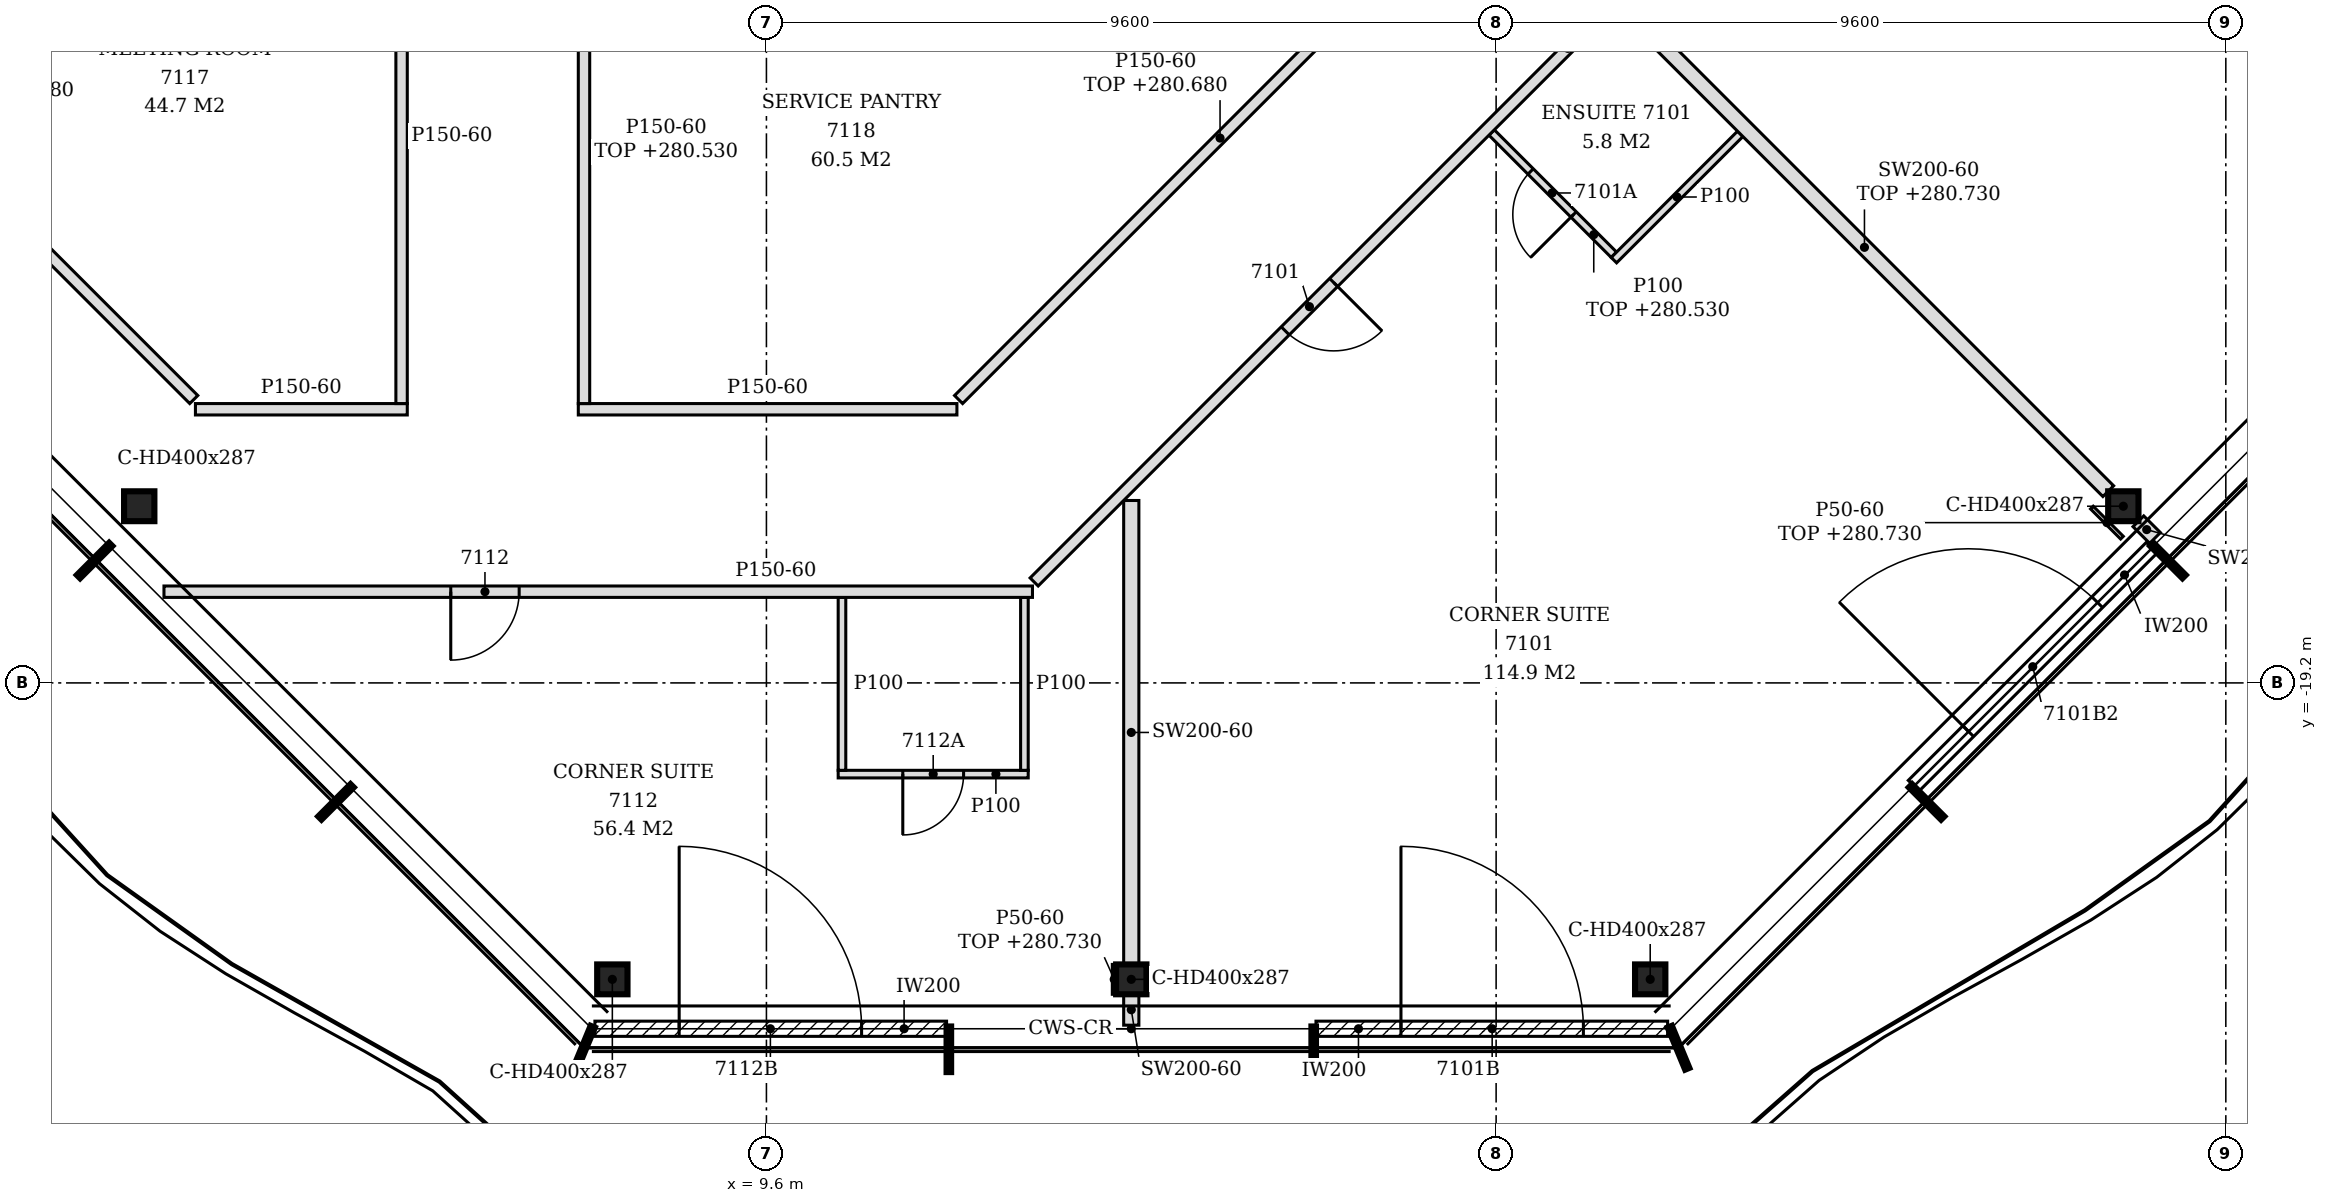
"""IFC4 building model, lengths in metres.
Left out: names, types, materials, properties, quantities, classifications, styles, units other than length and angle.
Written with IfcOpenShell. Run it as: python <this file> out.ifc"""

import sys

from ifc_helpers import new_model, si_unit, direction, frame, frame_2d, origin, origin_2d, place, context, subcontext, project, spatial, polyline, rectangle, i_section, outline, extrude, element, fill, save


model = new_model("IFC4")
c1 = context("Model", 3, precision=1e-05, world=origin(), true_north=direction((0.0, 1.0)))
c2 = subcontext(c1, "Body", "Model", "MODEL_VIEW")
j1 = project(units=[si_unit("LENGTHUNIT", "METRE"), si_unit("PLANEANGLEUNIT", "RADIAN")], contexts=[c1])
p1 = place(None, origin())
s1 = spatial("IfcSite", under=j1, at=p1, CompositionType="ELEMENT")
p2 = place(p1, origin())
s2 = spatial("IfcBuilding", under=s1, at=p2, CompositionType="ELEMENT")
p3 = place(p2, frame((0.0, 0.0, 277.8)))
s3 = spatial("IfcBuildingStorey", under=s2, at=p3, CompositionType="ELEMENT", Elevation=277.8)
for number, where, z_axis, x_axis in (
    (1, (7.573, -23.1, -0.15), (0.0, 0.0, 1.0), (1.0, 0.0, 0.0)),
    (2, (14.4, -23.1, -0.15), (0.0, 0.0, 1.0), (1.0, 0.0, 0.0)),
    (3, (21.227, -23.1, -0.15), (0.0, 0.0, 1.0), (1.0, 0.0, 0.0)),
    (4, (27.451, -16.876, -0.15), (0.0, 0.0, 1.0), (1.0, 0.0, 0.0)),
    (5, (1.348, -16.876, -0.15), (0.0, 0.0, 1.0), (1.0, 0.0, 0.0)),
):
    element("IfcColumn", number, at=place(p3, frame(where, z_axis=z_axis, x_axis=x_axis)), inside=s3, PredefinedType="COLUMN", context=c2, shape_type="SweptSolid", body=[
        extrude(i_section(OverallWidth=0.399, OverallDepth=0.393, WebThickness=0.023, FlangeThickness=0.037, FilletRadius=0.015, at=origin_2d()), origin(), (0.0, 0.0, 1.0), 3.6),
    ])
p4 = place(p3, frame((7.344, -23.75, 0.0), z_axis=(0.0, 0.0, 1.0), x_axis=(1.0, 0.0, 0.0)))
e6 = element("IfcWall", 6, at=p4, inside=s3, PredefinedType="NOTDEFINED", context=c2, shape_type="SweptSolid", body=[
    extrude(rectangle(XDim=4.626, YDim=0.2, at=frame_2d((2.313, 0.0))), origin(), (0.0, 0.0, 1.0), 3.45),
])
p5 = place(p4, frame((1.108, 0.0, 0.0)))
e7 = element("IfcOpeningElement", 7, at=p5, cuts=e6, PredefinedType="OPENING", context=c2, shape_type="SweptSolid", body=[
    extrude(rectangle(XDim=2.4, YDim=2.4, at=frame_2d((1.2, 1.2))), frame((0.0, 0.11, 0.0), z_axis=(0.0, -1.0, 0.0), x_axis=(1.0, 0.0, 0.0)), (0.0, 0.0, 1.0), 0.22),
])
p6 = place(p3, frame((16.83, -23.75, 0.0), z_axis=(0.0, 0.0, 1.0), x_axis=(1.0, 0.0, 0.0)))
e8 = element("IfcWall", 8, at=p6, inside=s3, PredefinedType="NOTDEFINED", context=c2, shape_type="SweptSolid", body=[
    extrude(rectangle(XDim=4.626, YDim=0.2, at=frame_2d((2.313, 0.0))), origin(), (0.0, 0.0, 1.0), 3.45),
])
p7 = place(p6, frame((1.118, 0.0, 0.0)))
e9 = element("IfcOpeningElement", 9, at=p7, cuts=e8, PredefinedType="OPENING", context=c2, shape_type="SweptSolid", body=[
    extrude(rectangle(XDim=2.4, YDim=2.4, at=frame_2d((1.2, 1.2))), frame((0.0, 0.11, 0.0), z_axis=(0.0, -1.0, 0.0), x_axis=(1.0, 0.0, 0.0)), (0.0, 0.0, 1.0), 0.22),
])
p8 = place(p3, frame((24.693, -20.553, 0.0), z_axis=(0.0, 0.0, 1.0), x_axis=(0.707079231393, 0.707134329907, 0.0)))
e10 = element("IfcWall", 10, at=p8, inside=s3, PredefinedType="NOTDEFINED", context=c2, shape_type="SweptSolid", body=[
    extrude(rectangle(XDim=4.431, YDim=0.2, at=frame_2d((2.215, 0.0))), origin(), (0.0, 0.0, 1.0), 3.45),
])
p9 = place(p8, frame((1.015, 0.0, 0.0)))
e11 = element("IfcOpeningElement", 11, at=p9, cuts=e10, PredefinedType="OPENING", context=c2, shape_type="SweptSolid", body=[
    extrude(rectangle(XDim=2.4, YDim=2.4, at=frame_2d((1.2, 1.2))), frame((0.0, 0.11, 0.0), z_axis=(0.0, -1.0, 0.0), x_axis=(1.0, 0.0, 0.0)), (0.0, 0.0, 1.0), 0.22),
])
p10 = place(p3, frame((14.4, -23.703, 0.0), z_axis=(0.0, 0.0, 1.0), x_axis=(0.0, 1.0, 0.0)))
e12 = element("IfcWall", 12, at=p10, inside=s3, PredefinedType="PARTITIONING", context=c2, shape_type="SweptSolid", body=[
    extrude(rectangle(XDim=0.406, YDim=0.2, at=frame_2d((0.203, 0.0))), origin(), (0.0, 0.0, 1.0), 3.45),
])
p11 = place(p3, frame((14.4, -22.904, 0.0), z_axis=(0.0, 0.0, 1.0), x_axis=(0.0, 1.0, 0.0)))
e13 = element("IfcWall", 13, at=p11, inside=s3, PredefinedType="PARTITIONING", context=c2, shape_type="SweptSolid", body=[
    extrude(outline(polyline([(0.0, 0.0), (6.104, 0.0), (6.104, 3.45), (3.809, 3.45), (3.806, 2.88), (3.598, 2.88), (3.596, 3.45), (0.0, 3.45), (0.0, 0.0)])), frame((0.0, 0.1, 0.0), z_axis=(0.0, -1.0, 0.0), x_axis=(1.0, 0.0, 0.0)), (0.0, 0.0, 1.0), 0.2),
])
p12 = place(p3, frame((10.544, -20.4, 0.0), z_axis=(0.0, 0.0, 1.0), x_axis=(1.0, 0.0, 0.0)))
e14 = element("IfcWall", 14, at=p12, inside=s3, PredefinedType="PARTITIONING", context=c2, shape_type="SweptSolid", body=[
    extrude(rectangle(XDim=2.5, YDim=0.1, at=frame_2d((1.25, 0.0))), origin(), (0.0, 0.0, 1.0), 3.45),
])
p13 = place(p12, frame((0.85, 0.0, 0.0)))
e15 = element("IfcOpeningElement", 15, at=p13, cuts=e14, PredefinedType="OPENING", context=c2, shape_type="SweptSolid", body=[
    extrude(rectangle(XDim=0.8, YDim=2.1, at=frame_2d((0.4, 1.05))), frame((0.0, 0.06, 0.0), z_axis=(0.0, -1.0, 0.0), x_axis=(1.0, 0.0, 0.0)), (0.0, 0.0, 1.0), 0.12),
])
for number, where, z_axis, x_axis in (
    (16, (10.594, -20.35, 0.0), (0.0, 0.0, 1.0), (0.0, 1.0, 0.0)),
    (17, (12.994, -20.35, 0.0), (0.0, 0.0, 1.0), (0.0, 1.0, 0.0)),
):
    element("IfcWall", number, at=place(p3, frame(where, z_axis=z_axis, x_axis=x_axis)), inside=s3, PredefinedType="PARTITIONING", context=c2, shape_type="SweptSolid", body=[
        extrude(outline(polyline([(0.0, 0.0), (2.275, 0.0), (2.275, 3.45), (1.255, 3.45), (1.253, 2.88), (1.045, 2.88), (1.043, 3.45), (0.0, 3.45), (0.0, 0.0)])), frame((0.0, 0.05, 0.0), z_axis=(0.0, -1.0, 0.0), x_axis=(1.0, 0.0, 0.0)), (0.0, 0.0, 1.0), 0.1),
    ])
p14 = place(p3, frame((1.674, -18.0, 0.0), z_axis=(0.0, 0.0, 1.0), x_axis=(1.0, 0.0, 0.0)))
e18 = element("IfcWall", 18, at=p14, inside=s3, PredefinedType="PARTITIONING", context=c2, shape_type="SweptSolid", body=[
    extrude(outline(polyline([(0.0, 0.0), (11.426, 0.0), (11.426, 3.45), (5.676, 3.45), (5.674, 2.73), (5.376, 2.73), (5.374, 3.45), (1.086, 3.45), (1.084, 2.93), (0.512, 2.93), (0.51, 3.45), (0.0, 3.45), (0.0, 0.0)])), frame((0.0, 0.075, 0.0), z_axis=(0.0, -1.0, 0.0), x_axis=(1.0, 0.0, 0.0)), (0.0, 0.0, 1.0), 0.15),
])
p15 = place(p14, frame((3.773, 0.0, 0.0)))
e19 = element("IfcOpeningElement", 19, at=p15, cuts=e18, PredefinedType="OPENING", context=c2, shape_type="SweptSolid", body=[
    extrude(rectangle(XDim=0.9, YDim=2.1, at=frame_2d((0.45, 1.05))), frame((0.0, 0.085, 0.0), z_axis=(0.0, -1.0, 0.0), x_axis=(1.0, 0.0, 0.0)), (0.0, 0.0, 1.0), 0.17),
])
p16 = place(p3, frame((13.122, -17.872, 0.0), z_axis=(0.0, 0.0, 1.0), x_axis=(0.707101927234, 0.707111635106, 0.0)))
e20 = element("IfcWall", 20, at=p16, inside=s3, PredefinedType="PARTITIONING", context=c2, shape_type="SweptSolid", body=[
    extrude(rectangle(XDim=25.149, YDim=0.15, at=frame_2d((12.574, 0.0))), origin(), (0.0, 0.0, 1.0), 2.73),
])
p17 = place(p16, frame((4.672, 0.0, 0.0)))
e21 = element("IfcOpeningElement", 21, at=p17, cuts=e20, PredefinedType="OPENING", context=c2, shape_type="SweptSolid", body=[
    extrude(rectangle(XDim=0.9, YDim=2.1, at=frame_2d((0.45, 1.05))), frame((0.0, 0.085, 0.0), z_axis=(0.0, -1.0, 0.0), x_axis=(1.0, 0.0, 0.0)), (0.0, 0.0, 1.0), 0.17),
])
p18 = place(p16, frame((14.284, 0.0, 0.0)))
e22 = element("IfcOpeningElement", 22, at=p18, cuts=e20, PredefinedType="OPENING", context=c2, shape_type="SweptSolid", body=[
    extrude(rectangle(XDim=0.9, YDim=2.1, at=frame_2d((0.45, 1.05))), frame((0.0, 0.085, 0.0), z_axis=(0.0, -1.0, 0.0), x_axis=(1.0, 0.0, 0.0)), (0.0, 0.0, 1.0), 0.17),
])
p19 = place(p16, frame((22.704, 0.0, 0.0)))
e23 = element("IfcOpeningElement", 23, at=p19, cuts=e20, PredefinedType="OPENING", context=c2, shape_type="SweptSolid", body=[
    extrude(rectangle(XDim=0.9, YDim=2.1, at=frame_2d((0.45, 1.05))), frame((0.0, 0.085, 0.0), z_axis=(0.0, -1.0, 0.0), x_axis=(1.0, 0.0, 0.0)), (0.0, 0.0, 1.0), 0.17),
])
p20 = place(p3, frame((27.869, -17.293, 0.0), z_axis=(0.0, 0.0, 1.0), x_axis=(-0.707106781187, 0.707106781187, 0.0)))
e24 = element("IfcWall", 24, at=p20, inside=s3, PredefinedType="PARTITIONING", context=c2, shape_type="SweptSolid", body=[
    extrude(rectangle(XDim=0.31, YDim=0.2, at=frame_2d((0.155, 0.0))), origin(), (0.0, 0.0, 1.0), 3.45),
])
p21 = place(p3, frame((27.254, -16.677, 0.0), z_axis=(0.0, 0.0, 1.0), x_axis=(-0.707120235152, 0.707093326965, 0.0)))
e25 = element("IfcWall", 25, at=p21, inside=s3, PredefinedType="PARTITIONING", context=c2, shape_type="SweptSolid", body=[
    extrude(rectangle(XDim=9.073, YDim=0.2, at=frame_2d((4.537, 0.0))), origin(), (0.0, 0.0, 1.0), 2.93),
])
p22 = place(p3, frame((2.088, -15.6, 0.0), z_axis=(0.0, 0.0, 1.0), x_axis=(1.0, 0.0, 0.0)))
e26 = element("IfcWall", 26, at=p22, inside=s3, PredefinedType="PARTITIONING", context=c2, shape_type="SweptSolid", body=[
    extrude(rectangle(XDim=2.787, YDim=0.15, at=frame_2d((1.394, 0.0))), origin(), (0.0, 0.0, 1.0), 3.45),
])
p23 = place(p3, frame((7.125, -15.6, 0.0), z_axis=(0.0, 0.0, 1.0), x_axis=(1.0, 0.0, 0.0)))
e27 = element("IfcWall", 27, at=p23, inside=s3, PredefinedType="PARTITIONING", context=c2, shape_type="SweptSolid", body=[
    extrude(outline(polyline([(0.0, 0.0), (4.981, 0.0), (4.981, 3.45), (0.225, 3.45), (0.223, 2.73), (0.0, 2.73), (0.0, 0.0)])), frame((0.0, 0.075, 0.0), z_axis=(0.0, -1.0, 0.0), x_axis=(1.0, 0.0, 0.0)), (0.0, 0.0, 1.0), 0.15),
])
p24 = place(p3, frame((2.066, -15.472, 0.0), z_axis=(0.0, 0.0, 1.0), x_axis=(-0.707106781187, 0.707106781187, 0.0)))
e28 = element("IfcWall", 28, at=p24, inside=s3, PredefinedType="PARTITIONING", context=c2, shape_type="SweptSolid", body=[
    extrude(rectangle(XDim=9.529, YDim=0.15, at=frame_2d((4.765, 0.0))), origin(), (0.0, 0.0, 1.0), 2.98),
])
p25 = place(p3, frame((4.8, -15.525, 0.0), z_axis=(0.0, 0.0, 1.0), x_axis=(0.0, 1.0, 0.0)))
e29 = element("IfcWall", 29, at=p25, inside=s3, PredefinedType="PARTITIONING", context=c2, shape_type="SweptSolid", body=[
    extrude(outline(polyline([(0.0, 0.0), (7.05, 0.0), (7.05, 2.83), (6.975, 2.83), (6.973, 3.45), (1.22, 3.45), (1.218, 2.98), (1.03, 2.98), (1.028, 3.45), (0.0, 3.45), (0.0, 0.0)])), frame((0.0, 0.075, 0.0), z_axis=(0.0, -1.0, 0.0), x_axis=(1.0, 0.0, 0.0)), (0.0, 0.0, 1.0), 0.15),
])
p26 = place(p3, frame((7.2, -15.525, 0.0), z_axis=(0.0, 0.0, 1.0), x_axis=(0.0, 1.0, 0.0)))
e30 = element("IfcWall", 30, at=p26, inside=s3, PredefinedType="PARTITIONING", context=c2, shape_type="SweptSolid", body=[
    extrude(rectangle(XDim=6.938, YDim=0.15, at=frame_2d((3.469, 0.0))), origin(), (0.0, 0.0, 1.0), 2.73),
])
p27 = place(p3, frame((12.128, -15.472, 0.0), z_axis=(0.0, 0.0, 1.0), x_axis=(0.70711932755, 0.7070942346, 0.0)))
e31 = element("IfcWall", 31, at=p27, inside=s3, PredefinedType="PARTITIONING", context=c2, shape_type="SweptSolid", body=[
    extrude(rectangle(XDim=9.729, YDim=0.15, at=frame_2d((4.865, 0.0))), origin(), (0.0, 0.0, 1.0), 2.88),
])
p28 = place(p3, frame((20.75, -13.568, 0.0), z_axis=(0.0, 0.0, 1.0), x_axis=(-0.707053116953, 0.707160441348, 0.0)))
e32 = element("IfcWall", 32, at=p28, inside=s3, PredefinedType="PARTITIONING", context=c2, shape_type="SweptSolid", body=[
    extrude(rectangle(XDim=2.275, YDim=0.1, at=frame_2d((1.137, 0.0))), origin(), (0.0, 0.0, 1.0), 2.73),
])
p29 = place(p28, frame((0.75, 0.0, 0.0)))
e33 = element("IfcOpeningElement", 33, at=p29, cuts=e32, PredefinedType="OPENING", context=c2, shape_type="SweptSolid", body=[
    extrude(rectangle(XDim=0.8, YDim=2.1, at=frame_2d((0.4, 1.05))), frame((0.0, 0.06, 0.0), z_axis=(0.0, -1.0, 0.0), x_axis=(1.0, 0.0, 0.0)), (0.0, 0.0, 1.0), 0.12),
])
p30 = place(p3, frame((20.75, -13.638, 0.0), z_axis=(0.0, 0.0, 1.0), x_axis=(0.707158722772, 0.707054835785, 0.0)))
e34 = element("IfcWall", 34, at=p30, inside=s3, PredefinedType="PARTITIONING", context=c2, shape_type="SweptSolid", body=[
    extrude(rectangle(XDim=2.35, YDim=0.1, at=frame_2d((1.175, 0.0))), origin(), (0.0, 0.0, 1.0), 3.45),
])
p31 = place(p3, frame((14.176, -23.296, 0.0), z_axis=(0.0, 0.0, 1.0), x_axis=(0.0, 1.0, 0.0)))
e35 = element("IfcWall", 35, at=p31, inside=s3, PredefinedType="PARTITIONING", context=c2, shape_type="SweptSolid", body=[
    extrude(rectangle(XDim=0.393, YDim=0.05, at=frame_2d((0.196, 0.0))), origin(), (0.0, 0.0, 1.0), 2.93),
])
p32 = place(p3, frame((27.434, -17.289, 0.0), z_axis=(0.0, 0.0, 1.0), x_axis=(-0.707106781187, 0.707106781187, 0.0)))
e36 = element("IfcWall", 36, at=p32, inside=s3, PredefinedType="PARTITIONING", context=c2, shape_type="SweptSolid", body=[
    extrude(rectangle(XDim=0.56, YDim=0.05, at=frame_2d((0.28, 0.0))), origin(), (0.0, 0.0, 1.0), 2.93),
])
p33 = place(p5, origin())
e37 = element("IfcDoor", 37, at=p33, inside=s3, OperationType="SINGLE_SWING_LEFT", PredefinedType="DOOR", context=c2, shape_type="SweptSolid", body=[
    extrude(rectangle(XDim=2.4, YDim=2.4, at=frame_2d((1.2, 1.2))), frame((0.0, 0.025, 0.0), z_axis=(0.0, -1.0, 0.0), x_axis=(1.0, 0.0, 0.0)), (0.0, 0.0, 1.0), 0.05),
])
fill(e7, e37)
p34 = place(p7, origin())
e38 = element("IfcDoor", 38, at=p34, inside=s3, OperationType="SINGLE_SWING_LEFT", PredefinedType="DOOR", context=c2, shape_type="SweptSolid", body=[
    extrude(rectangle(XDim=2.4, YDim=2.4, at=frame_2d((1.2, 1.2))), frame((0.0, 0.025, 0.0), z_axis=(0.0, -1.0, 0.0), x_axis=(1.0, 0.0, 0.0)), (0.0, 0.0, 1.0), 0.05),
])
fill(e9, e38)
p35 = place(p9, origin())
e39 = element("IfcDoor", 39, at=p35, inside=s3, OperationType="SINGLE_SWING_LEFT", PredefinedType="DOOR", context=c2, shape_type="SweptSolid", body=[
    extrude(rectangle(XDim=2.4, YDim=2.4, at=frame_2d((1.2, 1.2))), frame((0.0, 0.025, 0.0), z_axis=(0.0, -1.0, 0.0), x_axis=(1.0, 0.0, 0.0)), (0.0, 0.0, 1.0), 0.05),
])
fill(e11, e39)
p36 = place(p17, frame((0.9, 0.0, 0.0), z_axis=(0.0, 0.0, 1.0), x_axis=(-1.0, 0.0, 0.0)))
e40 = element("IfcDoor", 40, at=p36, inside=s3, OperationType="SINGLE_SWING_LEFT", PredefinedType="DOOR", context=c2, shape_type="SweptSolid", body=[
    extrude(rectangle(XDim=0.9, YDim=2.1, at=frame_2d((0.45, 1.05))), frame((0.0, 0.025, 0.0), z_axis=(0.0, -1.0, 0.0), x_axis=(1.0, 0.0, 0.0)), (0.0, 0.0, 1.0), 0.05),
])
fill(e21, e40)
p37 = place(p29, origin())
e41 = element("IfcDoor", 41, at=p37, inside=s3, OperationType="SINGLE_SWING_LEFT", PredefinedType="DOOR", context=c2, shape_type="SweptSolid", body=[
    extrude(rectangle(XDim=0.8, YDim=2.1, at=frame_2d((0.4, 1.05))), frame((0.0, 0.025, 0.0), z_axis=(0.0, -1.0, 0.0), x_axis=(1.0, 0.0, 0.0)), (0.0, 0.0, 1.0), 0.05),
])
fill(e33, e41)
p38 = place(p15, frame((0.9, 0.0, 0.0), z_axis=(0.0, 0.0, 1.0), x_axis=(-1.0, 0.0, 0.0)))
e42 = element("IfcDoor", 42, at=p38, inside=s3, OperationType="SINGLE_SWING_RIGHT", PredefinedType="DOOR", context=c2, shape_type="SweptSolid", body=[
    extrude(rectangle(XDim=0.9, YDim=2.1, at=frame_2d((0.45, 1.05))), frame((0.0, 0.025, 0.0), z_axis=(0.0, -1.0, 0.0), x_axis=(1.0, 0.0, 0.0)), (0.0, 0.0, 1.0), 0.05),
])
fill(e19, e42)
p39 = place(p13, frame((0.8, 0.0, 0.0), z_axis=(0.0, 0.0, 1.0), x_axis=(-1.0, 0.0, 0.0)))
e43 = element("IfcDoor", 43, at=p39, inside=s3, OperationType="SINGLE_SWING_RIGHT", PredefinedType="DOOR", context=c2, shape_type="SweptSolid", body=[
    extrude(rectangle(XDim=0.8, YDim=2.1, at=frame_2d((0.4, 1.05))), frame((0.0, 0.025, 0.0), z_axis=(0.0, -1.0, 0.0), x_axis=(1.0, 0.0, 0.0)), (0.0, 0.0, 1.0), 0.05),
])
fill(e15, e43)
save(model, sys.argv[1])
